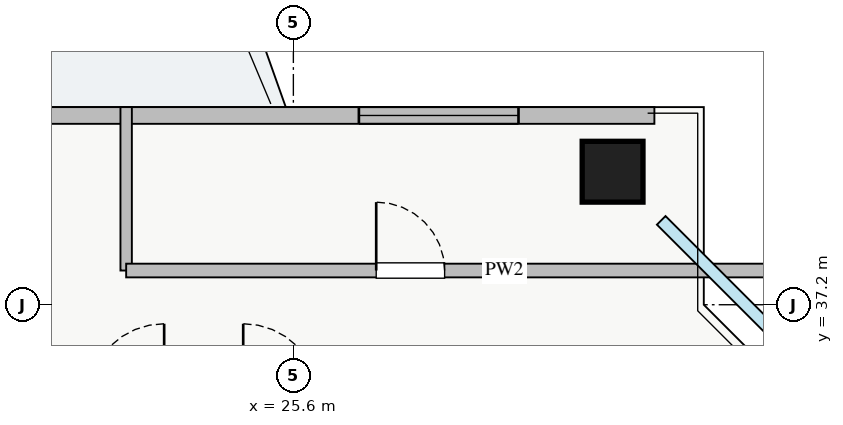
"""IFC4 building model, lengths in metres.
Left out: names, types, materials, properties, quantities, classifications, styles, units other than length and angle.
Written with IfcOpenShell. Run it as: python <this file> out.ifc"""

import sys

from ifc_helpers import new_model, si_unit, direction, frame, frame_2d, origin, origin_2d, place, context, subcontext, project, spatial, rectangle, extrude, source, transform, mapped, element, fill, save


model = new_model("IFC4")
c1 = context("Model", 3, precision=1e-05, world=origin(), true_north=direction((0.0, 1.0)))
c2 = subcontext(c1, "Body", "Model", "MODEL_VIEW")
j1 = project(units=[si_unit("LENGTHUNIT", "METRE"), si_unit("PLANEANGLEUNIT", "RADIAN")], contexts=[c1])
p1 = place(None, origin())
s1 = spatial("IfcSite", under=j1, at=p1, CompositionType="ELEMENT")
p2 = place(p1, origin())
s2 = spatial("IfcBuilding", under=s1, at=p2, CompositionType="ELEMENT")
p3 = place(p2, frame((0.0, 0.0, 200.25)))
s3 = spatial("IfcBuildingStorey", under=s2, at=p3, CompositionType="ELEMENT", Elevation=200.25)
m1 = source(origin(), c2, "Body", "SweptSolid", [
    extrude(rectangle(XDim=0.8, YDim=0.8, at=origin_2d()), origin(), (0.0, 0.0, 1.0), 3.25),
])
p4 = place(p3, frame((29.8, 38.95, 0.0), z_axis=(0.0, 0.0, 1.0), x_axis=(1.0, 0.0, 0.0)))
e1 = element("IfcColumn", 1, at=p4, inside=s3, PredefinedType="COLUMN", context=c2, shape_type="MappedRepresentation", body=[
    mapped(m1, transform((0.0, 0.0, 0.0), x_axis=(1.0, 0.0, 0.0), y_axis=(0.0, 1.0, 0.0), z_axis=(0.0, 0.0, 1.0), scale=1.0)),
])
p5 = place(p3, frame((7.65, 39.69, 0.0), z_axis=(0.0, 0.0, 1.0), x_axis=(1.0, 0.0, 0.0)))
e2 = element("IfcWall", 2, at=p5, inside=s3, PredefinedType="STANDARD", context=c2, shape_type="SweptSolid", body=[
    extrude(rectangle(XDim=22.7, YDim=0.22, at=frame_2d((11.35, 0.0))), origin(), (0.0, 0.0, 1.0), 2.61),
])
p6 = place(p5, frame((12.2, 0.0, 0.0)))
e3 = element("IfcOpeningElement", 3, at=p6, cuts=e2, PredefinedType="OPENING", context=c2, shape_type="SweptSolid", body=[
    extrude(rectangle(XDim=1.2, YDim=2.1, at=frame_2d((0.6, 1.05))), frame((0.0, 0.12, 0.0), z_axis=(0.0, -1.0, 0.0), x_axis=(1.0, 0.0, 0.0)), (0.0, 0.0, 1.0), 0.24),
])
p7 = place(p5, frame((1.637, 0.0, 0.9)))
e4 = element("IfcOpeningElement", 4, at=p7, cuts=e2, PredefinedType="OPENING", context=c2, shape_type="SweptSolid", body=[
    extrude(rectangle(XDim=2.4, YDim=1.48, at=frame_2d((1.2, 0.74))), frame((0.0, 0.12, 0.0), z_axis=(0.0, -1.0, 0.0), x_axis=(1.0, 0.0, 0.0)), (0.0, 0.0, 1.0), 0.24),
])
p8 = place(p5, frame((7.612, 0.0, 0.9)))
e5 = element("IfcOpeningElement", 5, at=p8, cuts=e2, PredefinedType="OPENING", context=c2, shape_type="SweptSolid", body=[
    extrude(rectangle(XDim=1.8, YDim=1.45, at=frame_2d((0.9, 0.725))), frame((0.0, 0.12, 0.0), z_axis=(0.0, -1.0, 0.0), x_axis=(1.0, 0.0, 0.0)), (0.0, 0.0, 1.0), 0.24),
])
p9 = place(p5, frame((18.812, 0.0, 0.9)))
e6 = element("IfcOpeningElement", 6, at=p9, cuts=e2, PredefinedType="OPENING", context=c2, shape_type="SweptSolid", body=[
    extrude(rectangle(XDim=2.1, YDim=1.48, at=frame_2d((1.05, 0.74))), frame((0.0, 0.12, 0.0), z_axis=(0.0, -1.0, 0.0), x_axis=(1.0, 0.0, 0.0)), (0.0, 0.0, 1.0), 0.24),
])
p10 = place(p3, frame((23.4, 37.65, 0.0), z_axis=(0.0, 0.0, 1.0), x_axis=(0.0, 1.0, 0.0)))
e7 = element("IfcWall", 7, at=p10, inside=s3, PredefinedType="PARTITIONING", context=c2, shape_type="SweptSolid", body=[
    extrude(rectangle(XDim=2.15, YDim=0.15, at=frame_2d((1.075, 0.0))), origin(), (0.0, 0.0, 1.0), 3.07),
])
p11 = place(p3, frame((23.4, 37.65, 0.0), z_axis=(0.0, 0.0, 1.0), x_axis=(1.0, 0.0, 0.0)))
e8 = element("IfcWall", 8, at=p11, inside=s3, PredefinedType="PARTITIONING", context=c2, shape_type="SweptSolid", body=[
    extrude(rectangle(XDim=9.05, YDim=0.18, at=frame_2d((4.525, 0.0))), origin(), (0.0, 0.0, 1.0), 3.07),
])
p12 = place(p11, frame((3.29, 0.0, 0.0)))
e9 = element("IfcOpeningElement", 9, at=p12, cuts=e8, PredefinedType="OPENING", context=c2, shape_type="SweptSolid", body=[
    extrude(rectangle(XDim=0.9, YDim=2.05, at=frame_2d((0.45, 1.025))), frame((0.0, 0.1, 0.0), z_axis=(0.0, -1.0, 0.0), x_axis=(1.0, 0.0, 0.0)), (0.0, 0.0, 1.0), 0.2),
])
m2 = source(origin(), c2, "Body", "SweptSolid", [
    extrude(rectangle(XDim=2.1, YDim=1.48, at=frame_2d((1.05, 0.74))), frame((0.0, 0.03, 0.0), z_axis=(0.0, -1.0, 0.0), x_axis=(1.0, 0.0, 0.0)), (0.0, 0.0, 1.0), 0.06),
])
p13 = place(p9, origin())
e10 = element("IfcWindow", 10, at=p13, inside=s3, PartitioningType="TRIPLE_PANEL_VERTICAL", PredefinedType="WINDOW", context=c2, shape_type="MappedRepresentation", body=[
    mapped(m2, transform((0.0, 0.0, 0.0), x_axis=(1.0, 0.0, 0.0), y_axis=(0.0, 1.0, 0.0), z_axis=(0.0, 0.0, 1.0), scale=1.0)),
])
fill(e6, e10)
m3 = source(origin(), c2, "Body", "SweptSolid", [
    extrude(rectangle(XDim=0.9, YDim=2.05, at=frame_2d((0.45, 1.025))), frame((0.0, 0.025, 0.0), z_axis=(0.0, -1.0, 0.0), x_axis=(1.0, 0.0, 0.0)), (0.0, 0.0, 1.0), 0.05),
])
p14 = place(p12, origin())
e11 = element("IfcDoor", 11, at=p14, inside=s3, OperationType="SINGLE_SWING_LEFT", PredefinedType="DOOR", context=c2, shape_type="MappedRepresentation", body=[
    mapped(m3, transform((0.0, 0.0, 0.0), x_axis=(1.0, 0.0, 0.0), y_axis=(0.0, 1.0, 0.0), z_axis=(0.0, 0.0, 1.0), scale=1.0)),
])
fill(e9, e11)
save(model, sys.argv[1])
